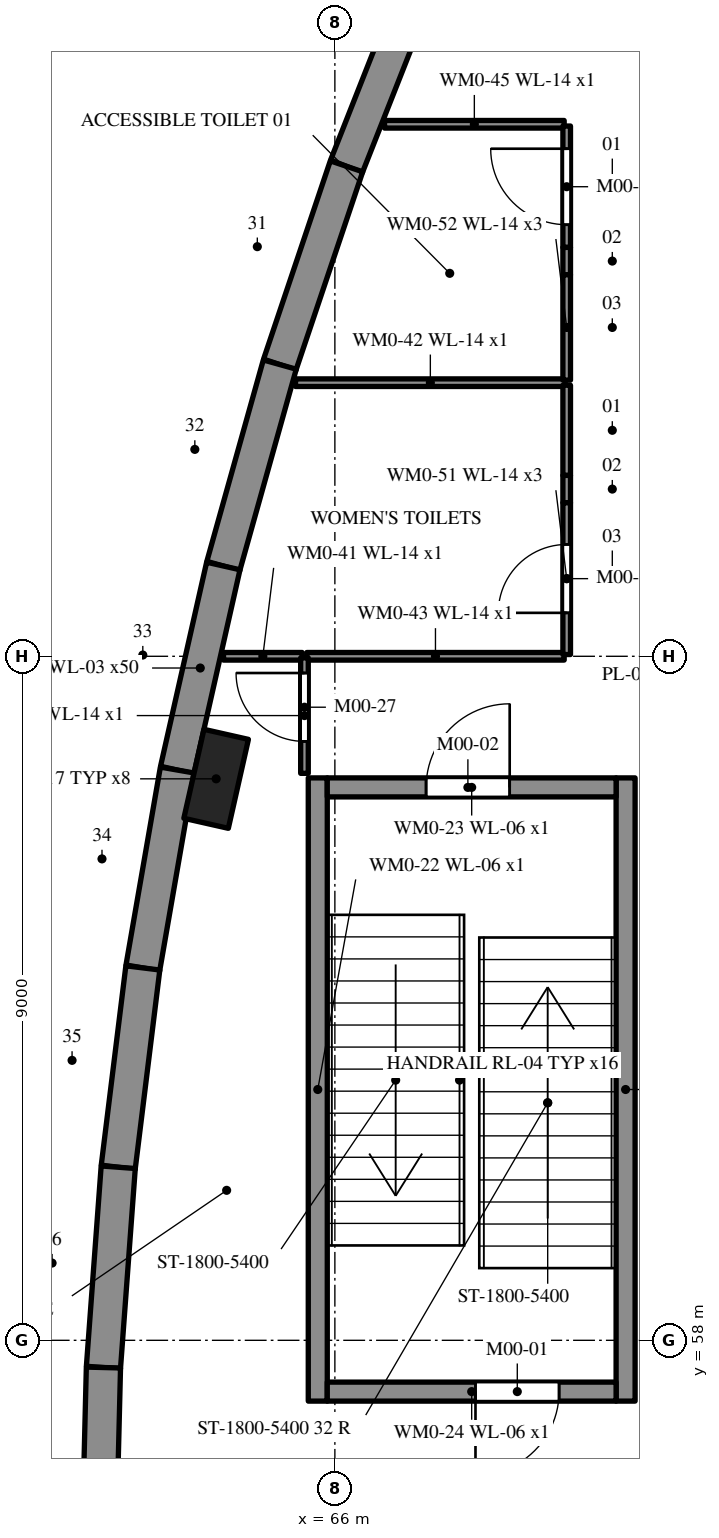
"""IFC4 building model, lengths in metres.
Left out: names, types, materials, properties, quantities, classifications, styles, units other than length and angle.
Written with IfcOpenShell. Run it as: python <this file> out.ifc"""

import sys

from ifc_helpers import new_model, si_unit, direction, frame, frame_2d, origin, origin_2d, place, context, subcontext, project, spatial, polyline, rectangle, outline, extrude, element, fill, save


model = new_model("IFC4")
c1 = context("Model", 3, precision=1e-05, world=origin(), true_north=direction((0.0, 1.0)))
c2 = subcontext(c1, "Body", "Model", "MODEL_VIEW")
j1 = project(units=[si_unit("LENGTHUNIT", "METRE"), si_unit("PLANEANGLEUNIT", "RADIAN")], contexts=[c1])
p1 = place(None, origin())
s1 = spatial("IfcSite", under=j1, at=p1, CompositionType="ELEMENT")
p2 = place(p1, origin())
s2 = spatial("IfcBuilding", under=s1, at=p2, CompositionType="ELEMENT")
p3 = place(p2, origin())
s3 = spatial("IfcBuildingStorey", under=s2, at=p3, CompositionType="ELEMENT", Elevation=0.0)
p4 = place(p3, frame((67.163, 76.007, 0.0), z_axis=(0.0, 0.0, 1.0), x_axis=(-0.366920100653, -0.930252460215, 0.0)))
e1 = element("IfcWall", 1, at=p4, inside=s3, PredefinedType="SOLIDWALL", context=c2, shape_type="SweptSolid", body=[
    extrude(rectangle(XDim=2.752, YDim=0.45, at=frame_2d((1.376, 0.0))), origin(), (0.0, 0.0, 1.0), 5.4),
])
for number, where, z_axis, x_axis in (
    (2, (66.153, 73.447, 0.0), (0.0, 0.0, 1.0), (-0.319, -0.948, 0.0)),
    (3, (65.275, 70.838, 0.0), (0.0, 0.0, 1.0), (-0.27, -0.963, 0.0)),
):
    element("IfcWall", number, at=place(p3, frame(where, z_axis=z_axis, x_axis=x_axis)), inside=s3, PredefinedType="SOLIDWALL", context=c2, shape_type="SweptSolid", body=[
        extrude(rectangle(XDim=2.752, YDim=0.45, at=frame_2d((1.376, 0.0))), origin(), (0.0, 0.0, 1.0), 5.4),
    ])
p5 = place(p3, frame((64.532, 68.188, 0.0), z_axis=(0.0, 0.0, 1.0), x_axis=(-0.220347996563, -0.975421324562, 0.0)))
e4 = element("IfcWall", 4, at=p5, inside=s3, PredefinedType="SOLIDWALL", context=c2, shape_type="SweptSolid", body=[
    extrude(rectangle(XDim=2.752, YDim=0.45, at=frame_2d((1.376, 0.0))), origin(), (0.0, 0.0, 1.0), 5.4),
])
p6 = place(p3, frame((63.926, 65.503, 0.0), z_axis=(0.0, 0.0, 1.0), x_axis=(-0.171196910379, -0.985236833394, 0.0)))
e5 = element("IfcWall", 5, at=p6, inside=s3, PredefinedType="SOLIDWALL", context=c2, shape_type="SweptSolid", body=[
    extrude(rectangle(XDim=2.643, YDim=0.45, at=frame_2d((1.321, 0.0))), origin(), (0.0, 0.0, 1.0), 5.4),
])
p7 = place(p3, frame((63.473, 62.9, 0.0), z_axis=(0.0, 0.0, 1.0), x_axis=(-0.122499610212, -0.992468561466, 0.0)))
e6 = element("IfcWall", 6, at=p7, inside=s3, PredefinedType="SOLIDWALL", context=c2, shape_type="SweptSolid", body=[
    extrude(rectangle(XDim=2.643, YDim=0.45, at=frame_2d((1.321, 0.0))), origin(), (0.0, 0.0, 1.0), 5.4),
])
p8 = place(p3, frame((63.15, 60.277, 0.0), z_axis=(0.0, 0.0, 1.0), x_axis=(-0.07363685767, -0.997285121313, 0.0)))
e7 = element("IfcWall", 7, at=p8, inside=s3, PredefinedType="SOLIDWALL", context=c2, shape_type="SweptSolid", body=[
    extrude(rectangle(XDim=2.642, YDim=0.45, at=frame_2d((1.321, 0.0))), origin(), (0.0, 0.0, 1.0), 5.4),
])
p9 = place(p3, frame((62.955, 57.642, 0.0), z_axis=(0.0, 0.0, 1.0), x_axis=(-0.024666736886, -0.999695729756, 0.0)))
e8 = element("IfcWall", 8, at=p9, inside=s3, PredefinedType="SOLIDWALL", context=c2, shape_type="SweptSolid", body=[
    extrude(rectangle(XDim=2.643, YDim=0.45, at=frame_2d((1.321, 0.0))), origin(), (0.0, 0.0, 1.0), 5.4),
])
p10 = place(p3, frame((64.438, 65.388, 0.0), z_axis=(0.0, 0.0, 1.0), x_axis=(-0.220356962886, -0.975419299024, 0.0)))
e9 = element("IfcColumn", 9, at=p10, inside=s3, PredefinedType="PILASTER", context=c2, shape_type="SweptSolid", body=[
    extrude(rectangle(XDim=1.2, YDim=0.6, at=origin_2d()), origin(), (0.0, 0.0, 1.0), 5.4),
])
for number, where, z_axis, x_axis in (
    (10, (69.825, 57.2, 0.0), (0.0, 0.0, 1.0), (0.0, 1.0, 0.0)),
    (11, (65.775, 65.4, 0.0), (0.0, 0.0, 1.0), (0.0, -1.0, 0.0)),
):
    element("IfcWall", number, at=place(p3, frame(where, z_axis=z_axis, x_axis=x_axis)), inside=s3, PredefinedType="SHEAR", context=c2, shape_type="SweptSolid", body=[
        extrude(rectangle(XDim=8.2, YDim=0.25, at=frame_2d((4.1, 0.0))), origin(), (0.0, 0.0, 1.0), 5.4),
    ])
p11 = place(p3, frame((65.9, 65.275, 0.0), z_axis=(0.0, 0.0, 1.0), x_axis=(1.0, 0.0, 0.0)))
e12 = element("IfcWall", 12, at=p11, inside=s3, PredefinedType="SHEAR", context=c2, shape_type="SweptSolid", body=[
    extrude(rectangle(XDim=3.8, YDim=0.25, at=frame_2d((1.9, 0.0))), origin(), (0.0, 0.0, 1.0), 5.4),
])
p12 = place(p11, frame((1.3, 0.0, 0.0)))
e13 = element("IfcOpeningElement", 13, at=p12, cuts=e12, PredefinedType="OPENING", context=c2, shape_type="SweptSolid", body=[
    extrude(rectangle(XDim=1.1, YDim=2.1, at=frame_2d((0.55, 1.05))), frame((0.0, 0.135, 0.0), z_axis=(0.0, -1.0, 0.0), x_axis=(1.0, 0.0, 0.0)), (0.0, 0.0, 1.0), 0.27),
])
p13 = place(p3, frame((69.7, 57.325, 0.0), z_axis=(0.0, 0.0, 1.0), x_axis=(-1.0, 0.0, 0.0)))
e14 = element("IfcWall", 14, at=p13, inside=s3, PredefinedType="SHEAR", context=c2, shape_type="SweptSolid", body=[
    extrude(rectangle(XDim=3.8, YDim=0.25, at=frame_2d((1.9, 0.0))), origin(), (0.0, 0.0, 1.0), 5.4),
])
p14 = place(p13, frame((0.75, 0.0, 0.0)))
e15 = element("IfcOpeningElement", 15, at=p14, cuts=e14, PredefinedType="OPENING", context=c2, shape_type="SweptSolid", body=[
    extrude(rectangle(XDim=1.1, YDim=2.1, at=frame_2d((0.55, 1.05))), frame((0.0, 0.135, 0.0), z_axis=(0.0, -1.0, 0.0), x_axis=(1.0, 0.0, 0.0)), (0.0, 0.0, 1.0), 0.27),
])
p15 = place(p3, frame((65.57, 67.0, 0.0), z_axis=(0.0, 0.0, 1.0), x_axis=(-1.0, 0.0, 0.0)))
e16 = element("IfcWall", 16, at=p15, inside=s3, PredefinedType="PARTITIONING", context=c2, shape_type="SweptSolid", body=[
    extrude(rectangle(XDim=1.035, YDim=0.1, at=frame_2d((0.518, 0.0))), origin(), (0.0, 0.0, 1.0), 5.15),
])
p16 = place(p3, frame((65.482, 70.6, 0.0), z_axis=(0.0, 0.0, 1.0), x_axis=(1.0, 0.0, 0.0)))
e17 = element("IfcWall", 17, at=p16, inside=s3, PredefinedType="PARTITIONING", context=c2, shape_type="SweptSolid", body=[
    extrude(rectangle(XDim=3.548, YDim=0.1, at=frame_2d((1.774, 0.0))), origin(), (0.0, 0.0, 1.0), 5.15),
])
p17 = place(p3, frame((69.017, 67.0, 0.0), z_axis=(0.0, 0.0, 1.0), x_axis=(-1.0, 0.0, 0.0)))
e18 = element("IfcWall", 18, at=p17, inside=s3, PredefinedType="PARTITIONING", context=c2, shape_type="SweptSolid", body=[
    extrude(rectangle(XDim=3.387, YDim=0.1, at=frame_2d((1.693, 0.0))), origin(), (0.0, 0.0, 1.0), 5.15),
])
p18 = place(p3, frame((65.6, 66.98, 0.0), z_axis=(0.0, 0.0, 1.0), x_axis=(0.0, -1.0, 0.0)))
e19 = element("IfcWall", 19, at=p18, inside=s3, PredefinedType="PARTITIONING", context=c2, shape_type="SweptSolid", body=[
    extrude(outline(polyline([(0.0, 0.0), (1.52, 0.0), (1.52, 5.15), (0.987, 5.15), (0.985, 4.42), (0.575, 4.42), (0.573, 5.15), (0.0, 5.15), (0.0, 0.0)])), frame((0.0, 0.05, 0.0), z_axis=(0.0, -1.0, 0.0), x_axis=(1.0, 0.0, 0.0)), (0.0, 0.0, 1.0), 0.1),
])
p19 = place(p18, frame((0.2, 0.0, 0.0)))
e20 = element("IfcOpeningElement", 20, at=p19, cuts=e19, PredefinedType="OPENING", context=c2, shape_type="SweptSolid", body=[
    extrude(rectangle(XDim=0.9, YDim=2.1, at=frame_2d((0.45, 1.05))), frame((0.0, 0.06, 0.0), z_axis=(0.0, -1.0, 0.0), x_axis=(1.0, 0.0, 0.0)), (0.0, 0.0, 1.0), 0.12),
])
p20 = place(p3, frame((66.653, 74.0, 0.0), z_axis=(0.0, 0.0, 1.0), x_axis=(1.0, 0.0, 0.0)))
e21 = element("IfcWall", 21, at=p20, inside=s3, PredefinedType="PARTITIONING", context=c2, shape_type="SweptSolid", body=[
    extrude(rectangle(XDim=2.364, YDim=0.1, at=frame_2d((1.182, 0.0))), origin(), (0.0, 0.0, 1.0), 5.15),
])
p21 = place(p3, frame((69.05, 70.567, 0.0), z_axis=(0.0, 0.0, 1.0), x_axis=(0.0, -1.0, 0.0)))
e22 = element("IfcWall", 22, at=p21, inside=s3, PredefinedType="PARTITIONING", context=c2, shape_type="SweptSolid", body=[
    extrude(rectangle(XDim=1.187, YDim=0.1, at=frame_2d((0.594, 0.0))), origin(), (0.0, 0.0, 1.0), 5.15),
])
p22 = place(p3, frame((69.05, 69.38, 0.0), z_axis=(0.0, 0.0, 1.0), x_axis=(0.0, -1.0, 0.0)))
e23 = element("IfcWall", 23, at=p22, inside=s3, PredefinedType="PARTITIONING", context=c2, shape_type="SweptSolid", body=[
    extrude(rectangle(XDim=0.36, YDim=0.1, at=frame_2d((0.18, 0.0))), origin(), (0.0, 0.0, 1.0), 4.52),
])
p23 = place(p3, frame((69.05, 69.02, 0.0), z_axis=(0.0, 0.0, 1.0), x_axis=(0.0, -1.0, 0.0)))
e24 = element("IfcWall", 24, at=p23, inside=s3, PredefinedType="PARTITIONING", context=c2, shape_type="SweptSolid", body=[
    extrude(rectangle(XDim=1.997, YDim=0.1, at=frame_2d((0.999, 0.0))), origin(), (0.0, 0.0, 1.0), 5.15),
])
p24 = place(p23, frame((0.548, 0.0, 0.0)))
e25 = element("IfcOpeningElement", 25, at=p24, cuts=e24, PredefinedType="OPENING", context=c2, shape_type="SweptSolid", body=[
    extrude(rectangle(XDim=0.9, YDim=2.1, at=frame_2d((0.45, 1.05))), frame((0.0, 0.06, 0.0), z_axis=(0.0, -1.0, 0.0), x_axis=(1.0, 0.0, 0.0)), (0.0, 0.0, 1.0), 0.12),
])
p25 = place(p3, frame((69.05, 73.977, 0.0), z_axis=(0.0, 0.0, 1.0), x_axis=(0.0, -1.0, 0.0)))
e26 = element("IfcWall", 26, at=p25, inside=s3, PredefinedType="PARTITIONING", context=c2, shape_type="SweptSolid", body=[
    extrude(rectangle(XDim=1.597, YDim=0.1, at=frame_2d((0.798, 0.0))), origin(), (0.0, 0.0, 1.0), 5.15),
])
p26 = place(p25, frame((0.299, 0.0, 0.0)))
e27 = element("IfcOpeningElement", 27, at=p26, cuts=e26, PredefinedType="OPENING", context=c2, shape_type="SweptSolid", body=[
    extrude(rectangle(XDim=1.0, YDim=2.1, at=frame_2d((0.5, 1.05))), frame((0.0, 0.06, 0.0), z_axis=(0.0, -1.0, 0.0), x_axis=(1.0, 0.0, 0.0)), (0.0, 0.0, 1.0), 0.12),
])
p27 = place(p3, frame((69.05, 72.38, 0.0), z_axis=(0.0, 0.0, 1.0), x_axis=(0.0, -1.0, 0.0)))
e28 = element("IfcWall", 28, at=p27, inside=s3, PredefinedType="PARTITIONING", context=c2, shape_type="SweptSolid", body=[
    extrude(rectangle(XDim=0.36, YDim=0.1, at=frame_2d((0.18, 0.0))), origin(), (0.0, 0.0, 1.0), 4.52),
])
p28 = place(p3, frame((69.05, 72.02, 0.0), z_axis=(0.0, 0.0, 1.0), x_axis=(0.0, -1.0, 0.0)))
e29 = element("IfcWall", 29, at=p28, inside=s3, PredefinedType="PARTITIONING", context=c2, shape_type="SweptSolid", body=[
    extrude(rectangle(XDim=1.387, YDim=0.1, at=frame_2d((0.693, 0.0))), origin(), (0.0, 0.0, 1.0), 5.15),
])
p29 = place(p14, origin())
e30 = element("IfcDoor", 30, at=p29, inside=s3, OperationType="SINGLE_SWING_RIGHT", PredefinedType="DOOR", context=c2, shape_type="SweptSolid", body=[
    extrude(rectangle(XDim=1.1, YDim=2.1, at=frame_2d((0.55, 1.05))), frame((0.0, 0.025, 0.0), z_axis=(0.0, -1.0, 0.0), x_axis=(1.0, 0.0, 0.0)), (0.0, 0.0, 1.0), 0.05),
])
fill(e15, e30)
p30 = place(p12, origin())
e31 = element("IfcDoor", 31, at=p30, inside=s3, OperationType="SINGLE_SWING_RIGHT", PredefinedType="DOOR", context=c2, shape_type="SweptSolid", body=[
    extrude(rectangle(XDim=1.1, YDim=2.1, at=frame_2d((0.55, 1.05))), frame((0.0, 0.025, 0.0), z_axis=(0.0, -1.0, 0.0), x_axis=(1.0, 0.0, 0.0)), (0.0, 0.0, 1.0), 0.05),
])
fill(e13, e31)
p31 = place(p24, frame((0.9, 0.0, 0.0), z_axis=(0.0, 0.0, 1.0), x_axis=(-1.0, 0.0, 0.0)))
e32 = element("IfcDoor", 32, at=p31, inside=s3, OperationType="SINGLE_SWING_LEFT", PredefinedType="DOOR", context=c2, shape_type="SweptSolid", body=[
    extrude(rectangle(XDim=0.9, YDim=2.1, at=frame_2d((0.45, 1.05))), frame((0.0, 0.025, 0.0), z_axis=(0.0, -1.0, 0.0), x_axis=(1.0, 0.0, 0.0)), (0.0, 0.0, 1.0), 0.05),
])
fill(e25, e32)
p32 = place(p26, frame((1.0, 0.0, 0.0), z_axis=(0.0, 0.0, 1.0), x_axis=(-1.0, 0.0, 0.0)))
e33 = element("IfcDoor", 33, at=p32, inside=s3, OperationType="SINGLE_SWING_RIGHT", PredefinedType="DOOR", context=c2, shape_type="SweptSolid", body=[
    extrude(rectangle(XDim=1.0, YDim=2.1, at=frame_2d((0.5, 1.05))), frame((0.0, 0.025, 0.0), z_axis=(0.0, -1.0, 0.0), x_axis=(1.0, 0.0, 0.0)), (0.0, 0.0, 1.0), 0.05),
])
fill(e27, e33)
p33 = place(p19, frame((0.9, 0.0, 0.0), z_axis=(0.0, 0.0, 1.0), x_axis=(-1.0, 0.0, 0.0)))
e34 = element("IfcDoor", 34, at=p33, inside=s3, OperationType="SINGLE_SWING_RIGHT", PredefinedType="DOOR", context=c2, shape_type="SweptSolid", body=[
    extrude(rectangle(XDim=0.9, YDim=2.1, at=frame_2d((0.45, 1.05))), frame((0.0, 0.025, 0.0), z_axis=(0.0, -1.0, 0.0), x_axis=(1.0, 0.0, 0.0)), (0.0, 0.0, 1.0), 0.05),
])
fill(e20, e34)
save(model, sys.argv[1])
